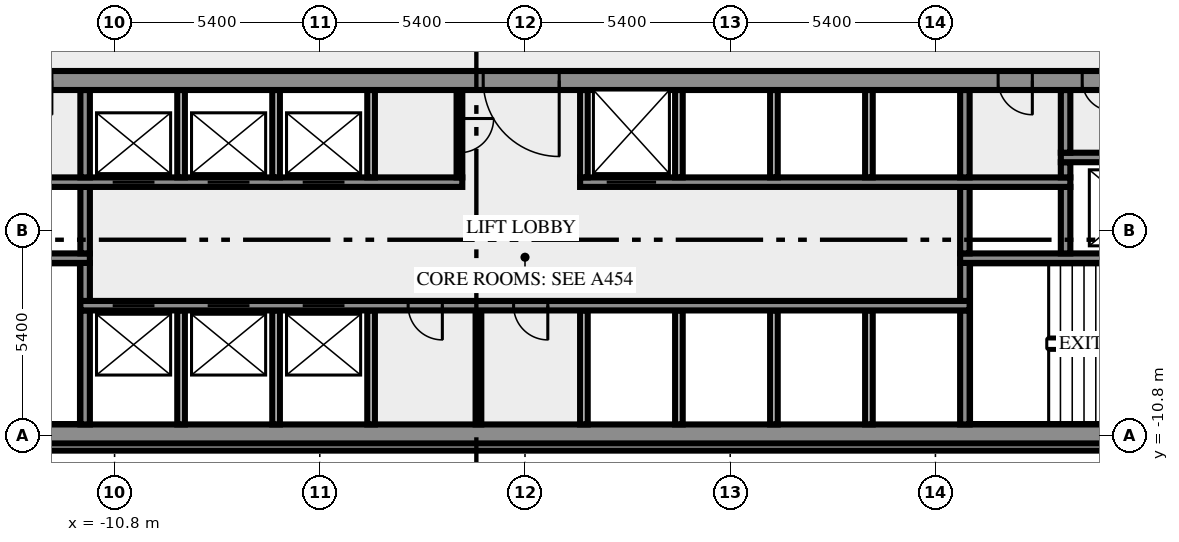
"""IFC4 building model, lengths in metres.
Left out: names, types, materials, properties, quantities, classifications, styles, units other than length and angle.
Written with IfcOpenShell. Run it as: python <this file> out.ifc"""

import sys

from ifc_helpers import new_model, si_unit, direction, frame, frame_2d, origin, place, context, subcontext, project, spatial, rectangle, extrude, element, fill, save


model = new_model("IFC4")
c1 = context("Model", 3, precision=1e-05, world=origin(), true_north=direction((0.0, 1.0)))
c2 = subcontext(c1, "Body", "Model", "MODEL_VIEW")
j1 = project(units=[si_unit("LENGTHUNIT", "METRE"), si_unit("PLANEANGLEUNIT", "RADIAN")], contexts=[c1])
p1 = place(None, origin())
s1 = spatial("IfcSite", under=j1, at=p1, CompositionType="ELEMENT")
p2 = place(p1, origin())
s2 = spatial("IfcBuilding", under=s1, at=p2, CompositionType="ELEMENT")
p3 = place(p2, frame((0.0, 0.0, 43.0)))
s3 = spatial("IfcBuildingStorey", under=s2, at=p3, CompositionType="ELEMENT", Elevation=43.0)
p4 = place(p3, frame((-17.444, -11.088, 0.0), z_axis=(0.0, 0.0, 1.0), x_axis=(1.0, 0.0, 0.0)))
e1 = element("IfcWall", 1, at=p4, inside=s3, PredefinedType="SOLIDWALL", context=c2, shape_type="SweptSolid", body=[
    extrude(rectangle(XDim=34.888, YDim=0.2, at=frame_2d((17.444, 0.0))), origin(), (0.0, 0.0, 1.0), 3.65),
])
p5 = place(p3, frame((-20.0, -10.75, 0.0), z_axis=(0.0, 0.0, 1.0), x_axis=(1.0, 0.0, 0.0)))
e2 = element("IfcWall", 2, at=p5, inside=s3, PredefinedType="SHEAR", context=c2, shape_type="SweptSolid", body=[
    extrude(rectangle(XDim=40.0, YDim=0.5, at=frame_2d((20.0, 0.0))), origin(), (0.0, 0.0, 1.0), 3.65),
])
p6 = place(p5, frame((0.8, 0.0, 1.0)))
e3 = element("IfcOpeningElement", 3, at=p6, cuts=e2, PredefinedType="OPENING", context=c2, shape_type="SweptSolid", body=[
    extrude(rectangle(XDim=1.2, YDim=1.2, at=frame_2d((0.6, 0.6))), frame((0.0, 0.26, 0.0), z_axis=(0.0, -1.0, 0.0), x_axis=(1.0, 0.0, 0.0)), (0.0, 0.0, 1.0), 0.52),
])
p7 = place(p5, frame((38.0, 0.0, 1.0)))
e4 = element("IfcOpeningElement", 4, at=p7, cuts=e2, PredefinedType="OPENING", context=c2, shape_type="SweptSolid", body=[
    extrude(rectangle(XDim=1.2, YDim=1.2, at=frame_2d((0.6, 0.6))), frame((0.0, 0.26, 0.0), z_axis=(0.0, -1.0, 0.0), x_axis=(1.0, 0.0, 0.0)), (0.0, 0.0, 1.0), 0.52),
])
p8 = place(p3, frame((-11.575, -10.5, 0.0), z_axis=(0.0, 0.0, 1.0), x_axis=(0.0, 1.0, 0.0)))
e5 = element("IfcWall", 5, at=p8, inside=s3, PredefinedType="SHEAR", context=c2, shape_type="SweptSolid", body=[
    extrude(rectangle(XDim=3.0, YDim=0.25, at=frame_2d((1.5, 0.0))), origin(), (0.0, 0.0, 1.0), 3.65),
])
for number, where, z_axis, x_axis in (
    (6, (-9.05, -10.5, 0.0), (0.0, 0.0, 1.0), (0.0, 1.0, 0.0)),
    (7, (-6.55, -10.5, 0.0), (0.0, 0.0, 1.0), (0.0, 1.0, 0.0)),
    (8, (-4.05, -10.5, 0.0), (0.0, 0.0, 1.0), (0.0, 1.0, 0.0)),
):
    element("IfcWall", number, at=place(p3, frame(where, z_axis=z_axis, x_axis=x_axis)), inside=s3, PredefinedType="SOLIDWALL", context=c2, shape_type="SweptSolid", body=[
        extrude(rectangle(XDim=3.0, YDim=0.2, at=frame_2d((1.5, 0.0))), origin(), (0.0, 0.0, 1.0), 3.65),
    ])
p9 = place(p3, frame((-1.225, -10.5, 0.0), z_axis=(0.0, 0.0, 1.0), x_axis=(0.0, 1.0, 0.0)))
e9 = element("IfcWall", 9, at=p9, inside=s3, PredefinedType="PARTITIONING", context=c2, shape_type="SweptSolid", body=[
    extrude(rectangle(XDim=3.0, YDim=0.15, at=frame_2d((1.5, 0.0))), origin(), (0.0, 0.0, 1.0), 3.65),
])
for number, where, z_axis, x_axis in (
    (10, (1.55, -10.5, 0.0), (0.0, 0.0, 1.0), (0.0, 1.0, 0.0)),
    (11, (4.05, -10.5, 0.0), (0.0, 0.0, 1.0), (0.0, 1.0, 0.0)),
    (12, (6.55, -10.5, 0.0), (0.0, 0.0, 1.0), (0.0, 1.0, 0.0)),
    (13, (9.05, -10.5, 0.0), (0.0, 0.0, 1.0), (0.0, 1.0, 0.0)),
):
    element("IfcWall", number, at=place(p3, frame(where, z_axis=z_axis, x_axis=x_axis)), inside=s3, PredefinedType="SOLIDWALL", context=c2, shape_type="SweptSolid", body=[
        extrude(rectangle(XDim=3.0, YDim=0.2, at=frame_2d((1.5, 0.0))), origin(), (0.0, 0.0, 1.0), 3.65),
    ])
p10 = place(p3, frame((11.575, -10.5, 0.0), z_axis=(0.0, 0.0, 1.0), x_axis=(0.0, 1.0, 0.0)))
e14 = element("IfcWall", 14, at=p10, inside=s3, PredefinedType="SHEAR", context=c2, shape_type="SweptSolid", body=[
    extrude(rectangle(XDim=3.0, YDim=0.25, at=frame_2d((1.5, 0.0))), origin(), (0.0, 0.0, 1.0), 3.65),
])
p11 = place(p3, frame((11.7, -7.375, 0.0), z_axis=(0.0, 0.0, 1.0), x_axis=(-1.0, 0.0, 0.0)))
e15 = element("IfcWall", 15, at=p11, inside=s3, PredefinedType="SHEAR", context=c2, shape_type="SweptSolid", body=[
    extrude(rectangle(XDim=23.4, YDim=0.25, at=frame_2d((11.7, 0.0))), origin(), (0.0, 0.0, 1.0), 3.65),
])
p12 = place(p11, frame((21.45, 0.0, 0.0)))
e16 = element("IfcOpeningElement", 16, at=p12, cuts=e15, PredefinedType="OPENING", context=c2, shape_type="SweptSolid", body=[
    extrude(rectangle(XDim=1.1, YDim=2.1, at=frame_2d((0.55, 1.05))), frame((0.0, 0.135, 0.0), z_axis=(0.0, -1.0, 0.0), x_axis=(1.0, 0.0, 0.0)), (0.0, 0.0, 1.0), 0.27),
])
p13 = place(p11, frame((18.95, 0.0, 0.0)))
e17 = element("IfcOpeningElement", 17, at=p13, cuts=e15, PredefinedType="OPENING", context=c2, shape_type="SweptSolid", body=[
    extrude(rectangle(XDim=1.1, YDim=2.1, at=frame_2d((0.55, 1.05))), frame((0.0, 0.135, 0.0), z_axis=(0.0, -1.0, 0.0), x_axis=(1.0, 0.0, 0.0)), (0.0, 0.0, 1.0), 0.27),
])
p14 = place(p11, frame((16.45, 0.0, 0.0)))
e18 = element("IfcOpeningElement", 18, at=p14, cuts=e15, PredefinedType="OPENING", context=c2, shape_type="SweptSolid", body=[
    extrude(rectangle(XDim=1.1, YDim=2.1, at=frame_2d((0.55, 1.05))), frame((0.0, 0.135, 0.0), z_axis=(0.0, -1.0, 0.0), x_axis=(1.0, 0.0, 0.0)), (0.0, 0.0, 1.0), 0.27),
])
p15 = place(p11, frame((13.875, 0.0, 0.0)))
e19 = element("IfcOpeningElement", 19, at=p15, cuts=e15, PredefinedType="OPENING", context=c2, shape_type="SweptSolid", body=[
    extrude(rectangle(XDim=0.9, YDim=2.1, at=frame_2d((0.45, 1.05))), frame((0.0, 0.135, 0.0), z_axis=(0.0, -1.0, 0.0), x_axis=(1.0, 0.0, 0.0)), (0.0, 0.0, 1.0), 0.27),
])
p16 = place(p11, frame((11.1, 0.0, 0.0)))
e20 = element("IfcOpeningElement", 20, at=p16, cuts=e15, PredefinedType="OPENING", context=c2, shape_type="SweptSolid", body=[
    extrude(rectangle(XDim=0.9, YDim=2.1, at=frame_2d((0.45, 1.05))), frame((0.0, 0.135, 0.0), z_axis=(0.0, -1.0, 0.0), x_axis=(1.0, 0.0, 0.0)), (0.0, 0.0, 1.0), 0.27),
])
for number, where, z_axis, x_axis in (
    (21, (-11.575, -7.25, 0.0), (0.0, 0.0, 1.0), (0.0, 1.0, 0.0)),
    (22, (11.575, -7.25, 0.0), (0.0, 0.0, 1.0), (0.0, 1.0, 0.0)),
):
    element("IfcWall", number, at=place(p3, frame(where, z_axis=z_axis, x_axis=x_axis)), inside=s3, PredefinedType="SHEAR", context=c2, shape_type="SweptSolid", body=[
        extrude(rectangle(XDim=1.0, YDim=0.25, at=frame_2d((0.5, 0.0))), origin(), (0.0, 0.0, 1.0), 3.65),
    ])
p17 = place(p3, frame((-11.45, -6.125, 0.0), z_axis=(0.0, 0.0, 1.0), x_axis=(-1.0, 0.0, 0.0)))
e23 = element("IfcWall", 23, at=p17, inside=s3, PredefinedType="SHEAR", context=c2, shape_type="SweptSolid", body=[
    extrude(rectangle(XDim=8.05, YDim=0.25, at=frame_2d((4.025, 0.0))), origin(), (0.0, 0.0, 1.0), 3.65),
])
p18 = place(p17, frame((6.2, 0.0, 0.0)))
e24 = element("IfcOpeningElement", 24, at=p18, cuts=e23, PredefinedType="OPENING", context=c2, shape_type="SweptSolid", body=[
    extrude(rectangle(XDim=1.8, YDim=2.1, at=frame_2d((0.9, 1.05))), frame((0.0, 0.135, 0.0), z_axis=(0.0, -1.0, 0.0), x_axis=(1.0, 0.0, 0.0)), (0.0, 0.0, 1.0), 0.27),
])
p19 = place(p3, frame((19.5, -6.125, 0.0), z_axis=(0.0, 0.0, 1.0), x_axis=(-1.0, 0.0, 0.0)))
e25 = element("IfcWall", 25, at=p19, inside=s3, PredefinedType="SHEAR", context=c2, shape_type="SweptSolid", body=[
    extrude(rectangle(XDim=8.05, YDim=0.25, at=frame_2d((4.025, 0.0))), origin(), (0.0, 0.0, 1.0), 3.65),
])
p20 = place(p19, frame((0.05, 0.0, 0.0)))
e26 = element("IfcOpeningElement", 26, at=p20, cuts=e25, PredefinedType="OPENING", context=c2, shape_type="SweptSolid", body=[
    extrude(rectangle(XDim=1.8, YDim=2.1, at=frame_2d((0.9, 1.05))), frame((0.0, 0.135, 0.0), z_axis=(0.0, -1.0, 0.0), x_axis=(1.0, 0.0, 0.0)), (0.0, 0.0, 1.0), 0.27),
])
for number, where, z_axis, x_axis in (
    (27, (-11.575, -6.0, 0.0), (0.0, 0.0, 1.0), (0.0, 1.0, 0.0)),
    (28, (11.575, -6.0, 0.0), (0.0, 0.0, 1.0), (0.0, 1.0, 0.0)),
    (29, (14.225, -6.0, 0.0), (0.0, 0.0, 1.0), (0.0, 1.0, 0.0)),
):
    element("IfcWall", number, at=place(p3, frame(where, z_axis=z_axis, x_axis=x_axis)), inside=s3, PredefinedType="SHEAR", context=c2, shape_type="SweptSolid", body=[
        extrude(rectangle(XDim=1.75, YDim=0.25, at=frame_2d((0.875, 0.0))), origin(), (0.0, 0.0, 1.0), 3.65),
    ])
p21 = place(p3, frame((-14.35, -4.125, 0.0), z_axis=(0.0, 0.0, 1.0), x_axis=(1.0, 0.0, 0.0)))
e30 = element("IfcWall", 30, at=p21, inside=s3, PredefinedType="SHEAR", context=c2, shape_type="SweptSolid", body=[
    extrude(rectangle(XDim=12.7, YDim=0.25, at=frame_2d((6.35, 0.0))), origin(), (0.0, 0.0, 1.0), 3.65),
])
p22 = place(p21, frame((3.5, 0.0, 0.0)))
e31 = element("IfcOpeningElement", 31, at=p22, cuts=e30, PredefinedType="OPENING", context=c2, shape_type="SweptSolid", body=[
    extrude(rectangle(XDim=1.1, YDim=2.1, at=frame_2d((0.55, 1.05))), frame((0.0, 0.135, 0.0), z_axis=(0.0, -1.0, 0.0), x_axis=(1.0, 0.0, 0.0)), (0.0, 0.0, 1.0), 0.27),
])
p23 = place(p21, frame((6.0, 0.0, 0.0)))
e32 = element("IfcOpeningElement", 32, at=p23, cuts=e30, PredefinedType="OPENING", context=c2, shape_type="SweptSolid", body=[
    extrude(rectangle(XDim=1.1, YDim=2.1, at=frame_2d((0.55, 1.05))), frame((0.0, 0.135, 0.0), z_axis=(0.0, -1.0, 0.0), x_axis=(1.0, 0.0, 0.0)), (0.0, 0.0, 1.0), 0.27),
])
p24 = place(p21, frame((8.5, 0.0, 0.0)))
e33 = element("IfcOpeningElement", 33, at=p24, cuts=e30, PredefinedType="OPENING", context=c2, shape_type="SweptSolid", body=[
    extrude(rectangle(XDim=1.1, YDim=2.1, at=frame_2d((0.55, 1.05))), frame((0.0, 0.135, 0.0), z_axis=(0.0, -1.0, 0.0), x_axis=(1.0, 0.0, 0.0)), (0.0, 0.0, 1.0), 0.27),
])
p25 = place(p3, frame((1.45, -4.125, 0.0), z_axis=(0.0, 0.0, 1.0), x_axis=(1.0, 0.0, 0.0)))
e34 = element("IfcWall", 34, at=p25, inside=s3, PredefinedType="SHEAR", context=c2, shape_type="SweptSolid", body=[
    extrude(rectangle(XDim=12.9, YDim=0.25, at=frame_2d((6.45, 0.0))), origin(), (0.0, 0.0, 1.0), 3.65),
])
p26 = place(p25, frame((0.7, 0.0, 0.0)))
e35 = element("IfcOpeningElement", 35, at=p26, cuts=e34, PredefinedType="OPENING", context=c2, shape_type="SweptSolid", body=[
    extrude(rectangle(XDim=1.3, YDim=2.1, at=frame_2d((0.65, 1.05))), frame((0.0, 0.135, 0.0), z_axis=(0.0, -1.0, 0.0), x_axis=(1.0, 0.0, 0.0)), (0.0, 0.0, 1.0), 0.27),
])
p27 = place(p3, frame((-11.575, -4.0, 0.0), z_axis=(0.0, 0.0, 1.0), x_axis=(0.0, 1.0, 0.0)))
e36 = element("IfcWall", 36, at=p27, inside=s3, PredefinedType="SHEAR", context=c2, shape_type="SweptSolid", body=[
    extrude(rectangle(XDim=2.3, YDim=0.25, at=frame_2d((1.15, 0.0))), origin(), (0.0, 0.0, 1.0), 3.65),
])
for number, where, z_axis, x_axis in (
    (37, (-9.05, -4.0, 0.0), (0.0, 0.0, 1.0), (0.0, 1.0, 0.0)),
    (38, (-6.55, -4.0, 0.0), (0.0, 0.0, 1.0), (0.0, 1.0, 0.0)),
    (39, (-4.05, -4.0, 0.0), (0.0, 0.0, 1.0), (0.0, 1.0, 0.0)),
):
    element("IfcWall", number, at=place(p3, frame(where, z_axis=z_axis, x_axis=x_axis)), inside=s3, PredefinedType="SOLIDWALL", context=c2, shape_type="SweptSolid", body=[
        extrude(rectangle(XDim=2.3, YDim=0.2, at=frame_2d((1.15, 0.0))), origin(), (0.0, 0.0, 1.0), 3.65),
    ])
p28 = place(p3, frame((-1.725, -1.7, 0.0), z_axis=(0.0, 0.0, 1.0), x_axis=(0.0, -1.0, 0.0)))
e40 = element("IfcWall", 40, at=p28, inside=s3, PredefinedType="PARTITIONING", context=c2, shape_type="SweptSolid", body=[
    extrude(rectangle(XDim=2.3, YDim=0.15, at=frame_2d((1.15, 0.0))), origin(), (0.0, 0.0, 1.0), 3.65),
])
p29 = place(p28, frame((0.75, 0.0, 0.0)))
e41 = element("IfcOpeningElement", 41, at=p29, cuts=e40, PredefinedType="OPENING", context=c2, shape_type="SweptSolid", body=[
    extrude(rectangle(XDim=0.9, YDim=2.1, at=frame_2d((0.45, 1.05))), frame((0.0, 0.085, 0.0), z_axis=(0.0, -1.0, 0.0), x_axis=(1.0, 0.0, 0.0)), (0.0, 0.0, 1.0), 0.17),
])
for number, where, z_axis, x_axis in (
    (42, (1.55, -4.0, 0.0), (0.0, 0.0, 1.0), (0.0, 1.0, 0.0)),
    (43, (4.05, -4.0, 0.0), (0.0, 0.0, 1.0), (0.0, 1.0, 0.0)),
    (44, (6.55, -4.0, 0.0), (0.0, 0.0, 1.0), (0.0, 1.0, 0.0)),
    (45, (9.05, -4.0, 0.0), (0.0, 0.0, 1.0), (0.0, 1.0, 0.0)),
):
    element("IfcWall", number, at=place(p3, frame(where, z_axis=z_axis, x_axis=x_axis)), inside=s3, PredefinedType="SOLIDWALL", context=c2, shape_type="SweptSolid", body=[
        extrude(rectangle(XDim=2.3, YDim=0.2, at=frame_2d((1.15, 0.0))), origin(), (0.0, 0.0, 1.0), 3.65),
    ])
p30 = place(p3, frame((11.575, -4.0, 0.0), z_axis=(0.0, 0.0, 1.0), x_axis=(0.0, 1.0, 0.0)))
e46 = element("IfcWall", 46, at=p30, inside=s3, PredefinedType="SHEAR", context=c2, shape_type="SweptSolid", body=[
    extrude(rectangle(XDim=2.3, YDim=0.25, at=frame_2d((1.15, 0.0))), origin(), (0.0, 0.0, 1.0), 3.65),
])
p31 = place(p3, frame((14.225, -4.0, 0.0), z_axis=(0.0, 0.0, 1.0), x_axis=(0.0, 1.0, 0.0)))
e47 = element("IfcWall", 47, at=p31, inside=s3, PredefinedType="SHEAR", context=c2, shape_type="SweptSolid", body=[
    extrude(rectangle(XDim=0.4, YDim=0.25, at=frame_2d((0.2, 0.0))), origin(), (0.0, 0.0, 1.0), 3.65),
])
p32 = place(p3, frame((14.1, -3.475, 0.0), z_axis=(0.0, 0.0, 1.0), x_axis=(1.0, 0.0, 0.0)))
e48 = element("IfcWall", 48, at=p32, inside=s3, PredefinedType="SHEAR", context=c2, shape_type="SweptSolid", body=[
    extrude(rectangle(XDim=3.25, YDim=0.25, at=frame_2d((1.625, 0.0))), origin(), (0.0, 0.0, 1.0), 3.65),
])
p33 = place(p3, frame((14.225, -3.35, 0.0), z_axis=(0.0, 0.0, 1.0), x_axis=(0.0, 1.0, 0.0)))
e49 = element("IfcWall", 49, at=p33, inside=s3, PredefinedType="SHEAR", context=c2, shape_type="SweptSolid", body=[
    extrude(rectangle(XDim=1.65, YDim=0.25, at=frame_2d((0.825, 0.0))), origin(), (0.0, 0.0, 1.0), 3.65),
])
p34 = place(p3, frame((20.49, -1.45, 0.0), z_axis=(0.0, 0.0, 1.0), x_axis=(-1.0, 0.0, 0.0)))
e50 = element("IfcWall", 50, at=p34, inside=s3, PredefinedType="SHEAR", context=c2, shape_type="SweptSolid", body=[
    extrude(rectangle(XDim=40.98, YDim=0.5, at=frame_2d((20.49, 0.0))), origin(), (0.0, 0.0, 1.0), 3.65),
])
p35 = place(p34, frame((38.14, 0.0, 0.0)))
e51 = element("IfcOpeningElement", 51, at=p35, cuts=e50, PredefinedType="OPENING", context=c2, shape_type="SweptSolid", body=[
    extrude(rectangle(XDim=1.8, YDim=2.1, at=frame_2d((0.9, 1.05))), frame((0.0, 0.26, 0.0), z_axis=(0.0, -1.0, 0.0), x_axis=(1.0, 0.0, 0.0)), (0.0, 0.0, 1.0), 0.52),
])
p36 = place(p34, frame((35.89, 0.0, 0.0)))
e52 = element("IfcOpeningElement", 52, at=p36, cuts=e50, PredefinedType="OPENING", context=c2, shape_type="SweptSolid", body=[
    extrude(rectangle(XDim=0.9, YDim=2.1, at=frame_2d((0.45, 1.05))), frame((0.0, 0.26, 0.0), z_axis=(0.0, -1.0, 0.0), x_axis=(1.0, 0.0, 0.0)), (0.0, 0.0, 1.0), 0.52),
])
p37 = place(p34, frame((32.94, 0.0, 0.0)))
e53 = element("IfcOpeningElement", 53, at=p37, cuts=e50, PredefinedType="OPENING", context=c2, shape_type="SweptSolid", body=[
    extrude(rectangle(XDim=0.9, YDim=2.1, at=frame_2d((0.45, 1.05))), frame((0.0, 0.26, 0.0), z_axis=(0.0, -1.0, 0.0), x_axis=(1.0, 0.0, 0.0)), (0.0, 0.0, 1.0), 0.52),
])
p38 = place(p34, frame((19.59, 0.0, 0.0)))
e54 = element("IfcOpeningElement", 54, at=p38, cuts=e50, PredefinedType="OPENING", context=c2, shape_type="SweptSolid", body=[
    extrude(rectangle(XDim=2.0, YDim=2.1, at=frame_2d((1.0, 1.05))), frame((0.0, 0.26, 0.0), z_axis=(0.0, -1.0, 0.0), x_axis=(1.0, 0.0, 0.0)), (0.0, 0.0, 1.0), 0.52),
])
p39 = place(p34, frame((7.14, 0.0, 0.0)))
e55 = element("IfcOpeningElement", 55, at=p39, cuts=e50, PredefinedType="OPENING", context=c2, shape_type="SweptSolid", body=[
    extrude(rectangle(XDim=0.9, YDim=2.1, at=frame_2d((0.45, 1.05))), frame((0.0, 0.26, 0.0), z_axis=(0.0, -1.0, 0.0), x_axis=(1.0, 0.0, 0.0)), (0.0, 0.0, 1.0), 0.52),
])
p40 = place(p34, frame((5.028, 0.0, 0.0)))
e56 = element("IfcOpeningElement", 56, at=p40, cuts=e50, PredefinedType="OPENING", context=c2, shape_type="SweptSolid", body=[
    extrude(rectangle(XDim=0.8, YDim=2.1, at=frame_2d((0.4, 1.05))), frame((0.0, 0.26, 0.0), z_axis=(0.0, -1.0, 0.0), x_axis=(1.0, 0.0, 0.0)), (0.0, 0.0, 1.0), 0.52),
])
p41 = place(p34, frame((3.452, 0.0, 0.0)))
e57 = element("IfcOpeningElement", 57, at=p41, cuts=e50, PredefinedType="OPENING", context=c2, shape_type="SweptSolid", body=[
    extrude(rectangle(XDim=0.8, YDim=2.1, at=frame_2d((0.4, 1.05))), frame((0.0, 0.26, 0.0), z_axis=(0.0, -1.0, 0.0), x_axis=(1.0, 0.0, 0.0)), (0.0, 0.0, 1.0), 0.52),
])
p42 = place(p34, frame((1.04, 0.0, 0.0)))
e58 = element("IfcOpeningElement", 58, at=p42, cuts=e50, PredefinedType="OPENING", context=c2, shape_type="SweptSolid", body=[
    extrude(rectangle(XDim=1.8, YDim=2.1, at=frame_2d((0.9, 1.05))), frame((0.0, 0.26, 0.0), z_axis=(0.0, -1.0, 0.0), x_axis=(1.0, 0.0, 0.0)), (0.0, 0.0, 1.0), 0.52),
])
p43 = place(p12, origin())
e59 = element("IfcDoor", 59, at=p43, inside=s3, OperationType="DOUBLE_DOOR_SLIDING", PredefinedType="DOOR", context=c2, shape_type="SweptSolid", body=[
    extrude(rectangle(XDim=1.1, YDim=2.1, at=frame_2d((0.55, 1.05))), frame((0.0, 0.025, 0.0), z_axis=(0.0, -1.0, 0.0), x_axis=(1.0, 0.0, 0.0)), (0.0, 0.0, 1.0), 0.05),
])
fill(e16, e59)
p44 = place(p13, origin())
e60 = element("IfcDoor", 60, at=p44, inside=s3, OperationType="DOUBLE_DOOR_SLIDING", PredefinedType="DOOR", context=c2, shape_type="SweptSolid", body=[
    extrude(rectangle(XDim=1.1, YDim=2.1, at=frame_2d((0.55, 1.05))), frame((0.0, 0.025, 0.0), z_axis=(0.0, -1.0, 0.0), x_axis=(1.0, 0.0, 0.0)), (0.0, 0.0, 1.0), 0.05),
])
fill(e17, e60)
p45 = place(p14, origin())
e61 = element("IfcDoor", 61, at=p45, inside=s3, OperationType="DOUBLE_DOOR_SLIDING", PredefinedType="DOOR", context=c2, shape_type="SweptSolid", body=[
    extrude(rectangle(XDim=1.1, YDim=2.1, at=frame_2d((0.55, 1.05))), frame((0.0, 0.025, 0.0), z_axis=(0.0, -1.0, 0.0), x_axis=(1.0, 0.0, 0.0)), (0.0, 0.0, 1.0), 0.05),
])
fill(e18, e61)
p46 = place(p15, origin())
e62 = element("IfcDoor", 62, at=p46, inside=s3, OperationType="SINGLE_SWING_RIGHT", PredefinedType="DOOR", context=c2, shape_type="SweptSolid", body=[
    extrude(rectangle(XDim=0.9, YDim=2.1, at=frame_2d((0.45, 1.05))), frame((0.0, 0.025, 0.0), z_axis=(0.0, -1.0, 0.0), x_axis=(1.0, 0.0, 0.0)), (0.0, 0.0, 1.0), 0.05),
])
fill(e19, e62)
p47 = place(p16, origin())
e63 = element("IfcDoor", 63, at=p47, inside=s3, OperationType="SINGLE_SWING_LEFT", PredefinedType="DOOR", context=c2, shape_type="SweptSolid", body=[
    extrude(rectangle(XDim=0.9, YDim=2.1, at=frame_2d((0.45, 1.05))), frame((0.0, 0.025, 0.0), z_axis=(0.0, -1.0, 0.0), x_axis=(1.0, 0.0, 0.0)), (0.0, 0.0, 1.0), 0.05),
])
fill(e20, e63)
p48 = place(p22, origin())
e64 = element("IfcDoor", 64, at=p48, inside=s3, OperationType="DOUBLE_DOOR_SLIDING", PredefinedType="DOOR", context=c2, shape_type="SweptSolid", body=[
    extrude(rectangle(XDim=1.1, YDim=2.1, at=frame_2d((0.55, 1.05))), frame((0.0, 0.025, 0.0), z_axis=(0.0, -1.0, 0.0), x_axis=(1.0, 0.0, 0.0)), (0.0, 0.0, 1.0), 0.05),
])
fill(e31, e64)
p49 = place(p23, origin())
e65 = element("IfcDoor", 65, at=p49, inside=s3, OperationType="DOUBLE_DOOR_SLIDING", PredefinedType="DOOR", context=c2, shape_type="SweptSolid", body=[
    extrude(rectangle(XDim=1.1, YDim=2.1, at=frame_2d((0.55, 1.05))), frame((0.0, 0.025, 0.0), z_axis=(0.0, -1.0, 0.0), x_axis=(1.0, 0.0, 0.0)), (0.0, 0.0, 1.0), 0.05),
])
fill(e32, e65)
p50 = place(p24, origin())
e66 = element("IfcDoor", 66, at=p50, inside=s3, OperationType="DOUBLE_DOOR_SLIDING", PredefinedType="DOOR", context=c2, shape_type="SweptSolid", body=[
    extrude(rectangle(XDim=1.1, YDim=2.1, at=frame_2d((0.55, 1.05))), frame((0.0, 0.025, 0.0), z_axis=(0.0, -1.0, 0.0), x_axis=(1.0, 0.0, 0.0)), (0.0, 0.0, 1.0), 0.05),
])
fill(e33, e66)
p51 = place(p26, origin())
e67 = element("IfcDoor", 67, at=p51, inside=s3, OperationType="DOUBLE_DOOR_SLIDING", PredefinedType="DOOR", context=c2, shape_type="SweptSolid", body=[
    extrude(rectangle(XDim=1.3, YDim=2.1, at=frame_2d((0.65, 1.05))), frame((0.0, 0.025, 0.0), z_axis=(0.0, -1.0, 0.0), x_axis=(1.0, 0.0, 0.0)), (0.0, 0.0, 1.0), 0.05),
])
fill(e35, e67)
p52 = place(p29, origin())
e68 = element("IfcDoor", 68, at=p52, inside=s3, OperationType="SINGLE_SWING_RIGHT", PredefinedType="DOOR", context=c2, shape_type="SweptSolid", body=[
    extrude(rectangle(XDim=0.9, YDim=2.1, at=frame_2d((0.45, 1.05))), frame((0.0, 0.025, 0.0), z_axis=(0.0, -1.0, 0.0), x_axis=(1.0, 0.0, 0.0)), (0.0, 0.0, 1.0), 0.05),
])
fill(e41, e68)
p53 = place(p38, origin())
e69 = element("IfcDoor", 69, at=p53, inside=s3, OperationType="DOUBLE_DOOR_SINGLE_SWING", PredefinedType="DOOR", context=c2, shape_type="SweptSolid", body=[
    extrude(rectangle(XDim=2.0, YDim=2.1, at=frame_2d((1.0, 1.05))), frame((0.0, 0.025, 0.0), z_axis=(0.0, -1.0, 0.0), x_axis=(1.0, 0.0, 0.0)), (0.0, 0.0, 1.0), 0.05),
])
fill(e54, e69)
p54 = place(p39, origin())
e70 = element("IfcDoor", 70, at=p54, inside=s3, OperationType="SINGLE_SWING_LEFT", PredefinedType="DOOR", context=c2, shape_type="SweptSolid", body=[
    extrude(rectangle(XDim=0.9, YDim=2.1, at=frame_2d((0.45, 1.05))), frame((0.0, 0.025, 0.0), z_axis=(0.0, -1.0, 0.0), x_axis=(1.0, 0.0, 0.0)), (0.0, 0.0, 1.0), 0.05),
])
fill(e55, e70)
p55 = place(p40, origin())
e71 = element("IfcDoor", 71, at=p55, inside=s3, OperationType="SINGLE_SWING_LEFT", PredefinedType="DOOR", context=c2, shape_type="SweptSolid", body=[
    extrude(rectangle(XDim=0.8, YDim=2.1, at=frame_2d((0.4, 1.05))), frame((0.0, 0.025, 0.0), z_axis=(0.0, -1.0, 0.0), x_axis=(1.0, 0.0, 0.0)), (0.0, 0.0, 1.0), 0.05),
])
fill(e56, e71)
save(model, sys.argv[1])
